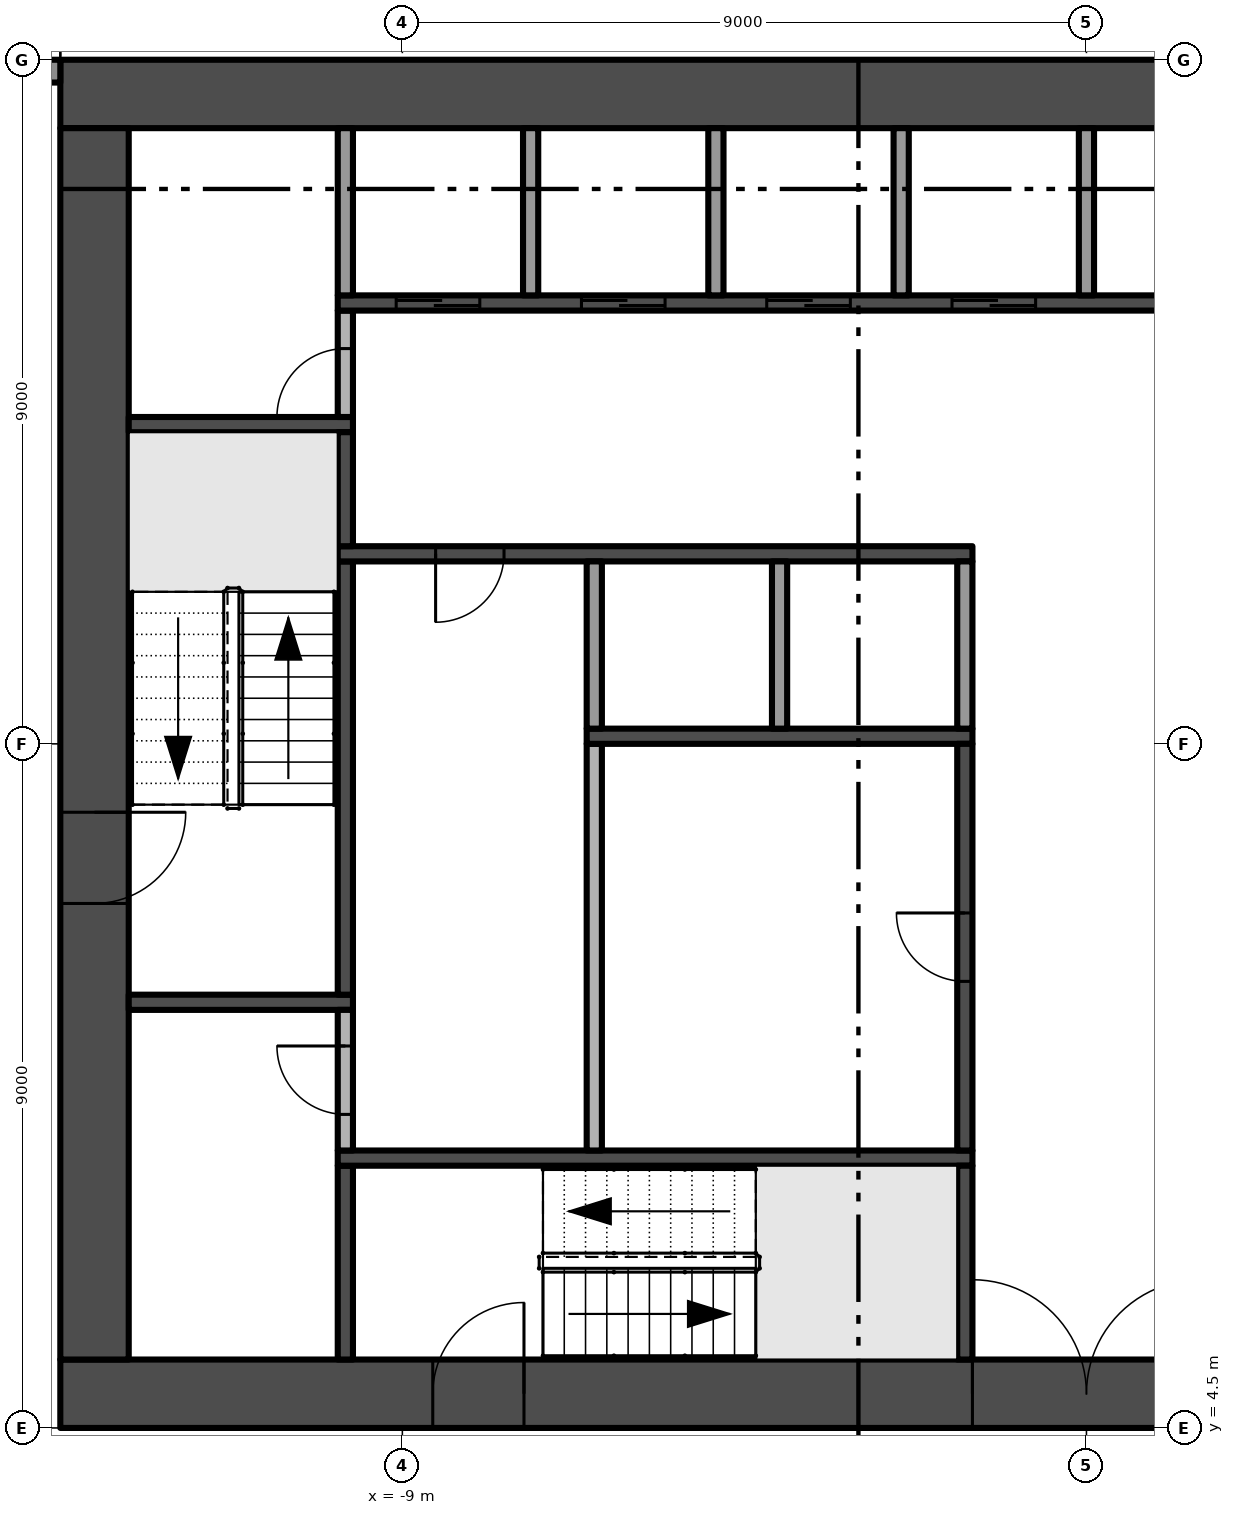
"""IFC4 building model, lengths in metres.
Left out: names, types, materials, properties, quantities, classifications, styles, units other than length and angle.
Written with IfcOpenShell. Run it as: python <this file> out.ifc"""

import sys

from ifc_helpers import new_model, si_unit, direction, frame, frame_2d, origin, place, context, subcontext, project, spatial, rectangle, extrude, element, fill, save


model = new_model("IFC4")
c1 = context("Model", 3, precision=1e-05, world=origin(), true_north=direction((0.0, 1.0)))
c2 = subcontext(c1, "Body", "Model", "MODEL_VIEW")
j1 = project(units=[si_unit("LENGTHUNIT", "METRE"), si_unit("PLANEANGLEUNIT", "RADIAN")], contexts=[c1])
p1 = place(None, origin())
s1 = spatial("IfcSite", under=j1, at=p1, CompositionType="ELEMENT")
p2 = place(p1, origin())
s2 = spatial("IfcBuilding", under=s1, at=p2, CompositionType="ELEMENT")
p3 = place(p2, frame((0.0, 0.0, 99.8)))
s3 = spatial("IfcBuildingStorey", under=s2, at=p3, CompositionType="ELEMENT", Elevation=99.8)
p4 = place(p3, frame((-13.5, 4.95, -0.3), z_axis=(0.0, 0.0, 1.0), x_axis=(1.0, 0.0, 0.0)))
e1 = element("IfcWall", 1, at=p4, inside=s3, PredefinedType="SHEAR", context=c2, shape_type="SweptSolid", body=[
    extrude(rectangle(XDim=27.0, YDim=0.9, at=frame_2d((13.5, 0.0))), origin(), (0.0, 0.0, 1.0), 3.8),
])
p5 = place(p4, frame((12.0, 0.0, 0.3)))
e2 = element("IfcOpeningElement", 2, at=p5, cuts=e1, PredefinedType="OPENING", context=c2, shape_type="SweptSolid", body=[
    extrude(rectangle(XDim=3.0, YDim=2.4, at=frame_2d((1.5, 1.2))), frame((0.0, 0.46, 0.0), z_axis=(0.0, -1.0, 0.0), x_axis=(1.0, 0.0, 0.0)), (0.0, 0.0, 1.0), 0.92),
])
p6 = place(p4, frame((4.9, 0.0, 0.3)))
e3 = element("IfcOpeningElement", 3, at=p6, cuts=e1, PredefinedType="OPENING", context=c2, shape_type="SweptSolid", body=[
    extrude(rectangle(XDim=1.2, YDim=2.2, at=frame_2d((0.6, 1.1))), frame((0.0, 0.46, 0.0), z_axis=(0.0, -1.0, 0.0), x_axis=(1.0, 0.0, 0.0)), (0.0, 0.0, 1.0), 0.92),
])
p7 = place(p4, frame((20.75, 0.0, 0.3)))
e4 = element("IfcOpeningElement", 4, at=p7, cuts=e1, PredefinedType="OPENING", context=c2, shape_type="SweptSolid", body=[
    extrude(rectangle(XDim=1.5, YDim=2.2, at=frame_2d((0.75, 1.1))), frame((0.0, 0.46, 0.0), z_axis=(0.0, -1.0, 0.0), x_axis=(1.0, 0.0, 0.0)), (0.0, 0.0, 1.0), 0.92),
])
p8 = place(p4, frame((17.4, 0.0, 0.3)))
e5 = element("IfcOpeningElement", 5, at=p8, cuts=e1, PredefinedType="OPENING", context=c2, shape_type="SweptSolid", body=[
    extrude(rectangle(XDim=1.2, YDim=2.2, at=frame_2d((0.6, 1.1))), frame((0.0, 0.46, 0.0), z_axis=(0.0, -1.0, 0.0), x_axis=(1.0, 0.0, 0.0)), (0.0, 0.0, 1.0), 0.92),
])
p9 = place(p3, frame((13.5, 22.05, -0.3), z_axis=(0.0, 0.0, 1.0), x_axis=(-1.0, 0.0, 0.0)))
e6 = element("IfcWall", 6, at=p9, inside=s3, PredefinedType="SHEAR", context=c2, shape_type="SweptSolid", body=[
    extrude(rectangle(XDim=27.0, YDim=0.9, at=frame_2d((13.5, 0.0))), origin(), (0.0, 0.0, 1.0), 3.8),
])
p10 = place(p3, frame((-13.05, 21.6, -0.3), z_axis=(0.0, 0.0, 1.0), x_axis=(0.0, -1.0, 0.0)))
e7 = element("IfcWall", 7, at=p10, inside=s3, PredefinedType="SHEAR", context=c2, shape_type="SweptSolid", body=[
    extrude(rectangle(XDim=16.2, YDim=0.9, at=frame_2d((8.1, 0.0))), origin(), (0.0, 0.0, 1.0), 3.8),
])
p11 = place(p10, frame((9.0, 0.0, 0.3)))
e8 = element("IfcOpeningElement", 8, at=p11, cuts=e7, PredefinedType="OPENING", context=c2, shape_type="SweptSolid", body=[
    extrude(rectangle(XDim=1.2, YDim=2.2, at=frame_2d((0.6, 1.1))), frame((0.0, 0.46, 0.0), z_axis=(0.0, -1.0, 0.0), x_axis=(1.0, 0.0, 0.0)), (0.0, 0.0, 1.0), 0.92),
])
p12 = place(p3, frame((-17.375, 22.35, 0.0), z_axis=(0.0, 0.0, 1.0), x_axis=(1.0, 0.0, 0.0)))
e9 = element("IfcWall", 9, at=p12, inside=s3, PredefinedType="SOLIDWALL", context=c2, shape_type="SweptSolid", body=[
    extrude(rectangle(XDim=3.875, YDim=0.3, at=frame_2d((1.938, 0.0))), origin(), (0.0, 0.0, 1.0), 3.5),
])
p13 = place(p12, frame((0.325, 0.0, 0.45)))
e10 = element("IfcOpeningElement", 10, at=p13, cuts=e9, PredefinedType="OPENING", context=c2, shape_type="SweptSolid", body=[
    extrude(rectangle(XDim=2.775, YDim=2.65, at=frame_2d((1.387, 1.325))), frame((0.0, 0.16, 0.0), z_axis=(0.0, -1.0, 0.0), x_axis=(1.0, 0.0, 0.0)), (0.0, 0.0, 1.0), 0.32),
])
for number, where, z_axis, x_axis in (
    (11, (-12.6, 10.1, 0.0), (0.0, 0.0, 1.0), (1.0, 0.0, 0.0)),
    (12, (-12.6, 17.7, 0.0), (0.0, 0.0, 1.0), (1.0, 0.0, 0.0)),
):
    element("IfcWall", number, at=place(p3, frame(where, z_axis=z_axis, x_axis=x_axis)), inside=s3, PredefinedType="SHEAR", context=c2, shape_type="SweptSolid", body=[
        extrude(rectangle(XDim=2.95, YDim=0.2, at=frame_2d((1.475, 0.0))), origin(), (0.0, 0.0, 1.0), 3.5),
    ])
p14 = place(p3, frame((-9.75, 5.4, 0.0), z_axis=(0.0, 0.0, 1.0), x_axis=(0.0, 1.0, 0.0)))
e13 = element("IfcWall", 13, at=p14, inside=s3, PredefinedType="SHEAR", context=c2, shape_type="SweptSolid", body=[
    extrude(rectangle(XDim=2.55, YDim=0.2, at=frame_2d((1.275, 0.0))), origin(), (0.0, 0.0, 1.0), 3.5),
])
p15 = place(p3, frame((-9.85, 8.05, 0.0), z_axis=(0.0, 0.0, 1.0), x_axis=(1.0, 0.0, 0.0)))
e14 = element("IfcWall", 14, at=p15, inside=s3, PredefinedType="SHEAR", context=c2, shape_type="SweptSolid", body=[
    extrude(rectangle(XDim=8.35, YDim=0.2, at=frame_2d((4.175, 0.0))), origin(), (0.0, 0.0, 1.0), 3.5),
])
p16 = place(p3, frame((-9.75, 8.15, 0.0), z_axis=(0.0, 0.0, 1.0), x_axis=(0.0, 1.0, 0.0)))
e15 = element("IfcWall", 15, at=p16, inside=s3, PredefinedType="PARTITIONING", context=c2, shape_type="SweptSolid", body=[
    extrude(rectangle(XDim=1.85, YDim=0.2, at=frame_2d((0.925, 0.0))), origin(), (0.0, 0.0, 1.0), 3.5),
])
p17 = place(p16, frame((0.475, 0.0, 0.0)))
e16 = element("IfcOpeningElement", 16, at=p17, cuts=e15, PredefinedType="OPENING", context=c2, shape_type="SweptSolid", body=[
    extrude(rectangle(XDim=0.9, YDim=2.1, at=frame_2d((0.45, 1.05))), frame((0.0, 0.11, 0.0), z_axis=(0.0, -1.0, 0.0), x_axis=(1.0, 0.0, 0.0)), (0.0, 0.0, 1.0), 0.22),
])
p18 = place(p3, frame((-9.75, 10.2, 0.0), z_axis=(0.0, 0.0, 1.0), x_axis=(0.0, 1.0, 0.0)))
e17 = element("IfcWall", 17, at=p18, inside=s3, PredefinedType="SHEAR", context=c2, shape_type="SweptSolid", body=[
    extrude(rectangle(XDim=5.7, YDim=0.2, at=frame_2d((2.85, 0.0))), origin(), (0.0, 0.0, 1.0), 3.5),
])
p19 = place(p3, frame((-1.5, 16.0, 0.0), z_axis=(0.0, 0.0, 1.0), x_axis=(-1.0, 0.0, 0.0)))
e18 = element("IfcWall", 18, at=p19, inside=s3, PredefinedType="SHEAR", context=c2, shape_type="SweptSolid", body=[
    extrude(rectangle(XDim=8.35, YDim=0.2, at=frame_2d((4.175, 0.0))), origin(), (0.0, 0.0, 1.0), 3.5),
])
p20 = place(p19, frame((6.162, 0.0, 0.0)))
e19 = element("IfcOpeningElement", 19, at=p20, cuts=e18, PredefinedType="OPENING", context=c2, shape_type="SweptSolid", body=[
    extrude(rectangle(XDim=0.9, YDim=2.1, at=frame_2d((0.45, 1.05))), frame((0.0, 0.11, 0.0), z_axis=(0.0, -1.0, 0.0), x_axis=(1.0, 0.0, 0.0)), (0.0, 0.0, 1.0), 0.22),
])
p21 = place(p3, frame((-9.75, 16.1, 0.0), z_axis=(0.0, 0.0, 1.0), x_axis=(0.0, 1.0, 0.0)))
e20 = element("IfcWall", 20, at=p21, inside=s3, PredefinedType="SHEAR", context=c2, shape_type="SweptSolid", body=[
    extrude(rectangle(XDim=1.5, YDim=0.2, at=frame_2d((0.75, 0.0))), origin(), (0.0, 0.0, 1.0), 3.5),
])
p22 = place(p3, frame((-9.75, 17.8, 0.0), z_axis=(0.0, 0.0, 1.0), x_axis=(0.0, 1.0, 0.0)))
e21 = element("IfcWall", 21, at=p22, inside=s3, PredefinedType="PARTITIONING", context=c2, shape_type="SweptSolid", body=[
    extrude(rectangle(XDim=1.4, YDim=0.2, at=frame_2d((0.7, 0.0))), origin(), (0.0, 0.0, 1.0), 3.5),
])
p23 = place(p22, origin())
e22 = element("IfcOpeningElement", 22, at=p23, cuts=e21, PredefinedType="OPENING", context=c2, shape_type="SweptSolid", body=[
    extrude(rectangle(XDim=0.9, YDim=2.1, at=frame_2d((0.45, 1.05))), frame((0.0, 0.11, 0.0), z_axis=(0.0, -1.0, 0.0), x_axis=(1.0, 0.0, 0.0)), (0.0, 0.0, 1.0), 0.22),
])
p24 = place(p3, frame((-9.85, 19.3, 0.0), z_axis=(0.0, 0.0, 1.0), x_axis=(1.0, 0.0, 0.0)))
e23 = element("IfcWall", 23, at=p24, inside=s3, PredefinedType="SHEAR", context=c2, shape_type="SweptSolid", body=[
    extrude(rectangle(XDim=19.7, YDim=0.2, at=frame_2d((9.85, 0.0))), origin(), (0.0, 0.0, 1.0), 3.5),
])
p25 = place(p24, frame((0.769, 0.0, 0.0)))
e24 = element("IfcOpeningElement", 24, at=p25, cuts=e23, PredefinedType="OPENING", context=c2, shape_type="SweptSolid", body=[
    extrude(rectangle(XDim=1.1, YDim=2.1, at=frame_2d((0.55, 1.05))), frame((0.0, 0.11, 0.0), z_axis=(0.0, -1.0, 0.0), x_axis=(1.0, 0.0, 0.0)), (0.0, 0.0, 1.0), 0.22),
])
p26 = place(p24, frame((3.206, 0.0, 0.0)))
e25 = element("IfcOpeningElement", 25, at=p26, cuts=e23, PredefinedType="OPENING", context=c2, shape_type="SweptSolid", body=[
    extrude(rectangle(XDim=1.1, YDim=2.1, at=frame_2d((0.55, 1.05))), frame((0.0, 0.11, 0.0), z_axis=(0.0, -1.0, 0.0), x_axis=(1.0, 0.0, 0.0)), (0.0, 0.0, 1.0), 0.22),
])
p27 = place(p24, frame((5.644, 0.0, 0.0)))
e26 = element("IfcOpeningElement", 26, at=p27, cuts=e23, PredefinedType="OPENING", context=c2, shape_type="SweptSolid", body=[
    extrude(rectangle(XDim=1.1, YDim=2.1, at=frame_2d((0.55, 1.05))), frame((0.0, 0.11, 0.0), z_axis=(0.0, -1.0, 0.0), x_axis=(1.0, 0.0, 0.0)), (0.0, 0.0, 1.0), 0.22),
])
p28 = place(p24, frame((8.081, 0.0, 0.0)))
e27 = element("IfcOpeningElement", 27, at=p28, cuts=e23, PredefinedType="OPENING", context=c2, shape_type="SweptSolid", body=[
    extrude(rectangle(XDim=1.1, YDim=2.1, at=frame_2d((0.55, 1.05))), frame((0.0, 0.11, 0.0), z_axis=(0.0, -1.0, 0.0), x_axis=(1.0, 0.0, 0.0)), (0.0, 0.0, 1.0), 0.22),
])
for number, where, z_axis, x_axis in (
    (28, (-9.75, 19.4, 0.0), (0.0, 0.0, 1.0), (0.0, 1.0, 0.0)),
    (29, (-7.312, 19.4, 0.0), (0.0, 0.0, 1.0), (0.0, 1.0, 0.0)),
):
    element("IfcWall", number, at=place(p3, frame(where, z_axis=z_axis, x_axis=x_axis)), inside=s3, PredefinedType="PARTITIONING", context=c2, shape_type="SweptSolid", body=[
        extrude(rectangle(XDim=2.2, YDim=0.2, at=frame_2d((1.1, 0.0))), origin(), (0.0, 0.0, 1.0), 3.5),
    ])
p29 = place(p3, frame((-6.475, 8.15, 0.0), z_axis=(0.0, 0.0, 1.0), x_axis=(0.0, 1.0, 0.0)))
e30 = element("IfcWall", 30, at=p29, inside=s3, PredefinedType="PARTITIONING", context=c2, shape_type="SweptSolid", body=[
    extrude(rectangle(XDim=5.35, YDim=0.2, at=frame_2d((2.675, 0.0))), origin(), (0.0, 0.0, 1.0), 3.5),
])
p30 = place(p3, frame((-6.575, 13.6, 0.0), z_axis=(0.0, 0.0, 1.0), x_axis=(1.0, 0.0, 0.0)))
e31 = element("IfcWall", 31, at=p30, inside=s3, PredefinedType="SHEAR", context=c2, shape_type="SweptSolid", body=[
    extrude(rectangle(XDim=5.075, YDim=0.2, at=frame_2d((2.538, 0.0))), origin(), (0.0, 0.0, 1.0), 3.5),
])
for number, where, z_axis, x_axis in (
    (32, (-6.475, 13.7, 0.0), (0.0, 0.0, 1.0), (0.0, 1.0, 0.0)),
    (33, (-4.875, 19.4, 0.0), (0.0, 0.0, 1.0), (0.0, 1.0, 0.0)),
    (34, (-4.037, 13.7, 0.0), (0.0, 0.0, 1.0), (0.0, 1.0, 0.0)),
    (35, (-2.438, 19.4, 0.0), (0.0, 0.0, 1.0), (0.0, 1.0, 0.0)),
):
    element("IfcWall", number, at=place(p3, frame(where, z_axis=z_axis, x_axis=x_axis)), inside=s3, PredefinedType="PARTITIONING", context=c2, shape_type="SweptSolid", body=[
        extrude(rectangle(XDim=2.2, YDim=0.2, at=frame_2d((1.1, 0.0))), origin(), (0.0, 0.0, 1.0), 3.5),
    ])
p31 = place(p3, frame((-1.6, 5.4, 0.0), z_axis=(0.0, 0.0, 1.0), x_axis=(0.0, 1.0, 0.0)))
e36 = element("IfcWall", 36, at=p31, inside=s3, PredefinedType="SHEAR", context=c2, shape_type="SweptSolid", body=[
    extrude(rectangle(XDim=2.55, YDim=0.2, at=frame_2d((1.275, 0.0))), origin(), (0.0, 0.0, 1.0), 3.5),
])
p32 = place(p3, frame((-1.6, 8.15, 0.0), z_axis=(0.0, 0.0, 1.0), x_axis=(0.0, 1.0, 0.0)))
e37 = element("IfcWall", 37, at=p32, inside=s3, PredefinedType="SHEAR", context=c2, shape_type="SweptSolid", body=[
    extrude(rectangle(XDim=5.35, YDim=0.2, at=frame_2d((2.675, 0.0))), origin(), (0.0, 0.0, 1.0), 3.5),
])
p33 = place(p32, frame((2.225, 0.0, 0.0)))
e38 = element("IfcOpeningElement", 38, at=p33, cuts=e37, PredefinedType="OPENING", context=c2, shape_type="SweptSolid", body=[
    extrude(rectangle(XDim=0.9, YDim=2.1, at=frame_2d((0.45, 1.05))), frame((0.0, 0.11, 0.0), z_axis=(0.0, -1.0, 0.0), x_axis=(1.0, 0.0, 0.0)), (0.0, 0.0, 1.0), 0.22),
])
for number, where, z_axis, x_axis in (
    (39, (-1.6, 13.7, 0.0), (0.0, 0.0, 1.0), (0.0, 1.0, 0.0)),
    (40, (0.0, 19.4, 0.0), (0.0, 0.0, 1.0), (0.0, 1.0, 0.0)),
):
    element("IfcWall", number, at=place(p3, frame(where, z_axis=z_axis, x_axis=x_axis)), inside=s3, PredefinedType="PARTITIONING", context=c2, shape_type="SweptSolid", body=[
        extrude(rectangle(XDim=2.2, YDim=0.2, at=frame_2d((1.1, 0.0))), origin(), (0.0, 0.0, 1.0), 3.5),
    ])
p34 = place(p5, frame((3.0, 0.0, 0.0), z_axis=(0.0, 0.0, 1.0), x_axis=(-1.0, 0.0, 0.0)))
e41 = element("IfcDoor", 41, at=p34, inside=s3, OperationType="DOUBLE_DOOR_SINGLE_SWING", PredefinedType="DOOR", context=c2, shape_type="SweptSolid", body=[
    extrude(rectangle(XDim=3.0, YDim=2.4, at=frame_2d((1.5, 1.2))), frame((0.0, 0.025, 0.0), z_axis=(0.0, -1.0, 0.0), x_axis=(1.0, 0.0, 0.0)), (0.0, 0.0, 1.0), 0.05),
])
fill(e2, e41)
p35 = place(p11, frame((1.2, 0.0, 0.0), z_axis=(0.0, 0.0, 1.0), x_axis=(-1.0, 0.0, 0.0)))
e42 = element("IfcDoor", 42, at=p35, inside=s3, OperationType="SINGLE_SWING_RIGHT", PredefinedType="DOOR", context=c2, shape_type="SweptSolid", body=[
    extrude(rectangle(XDim=1.2, YDim=2.2, at=frame_2d((0.6, 1.1))), frame((0.0, 0.025, 0.0), z_axis=(0.0, -1.0, 0.0), x_axis=(1.0, 0.0, 0.0)), (0.0, 0.0, 1.0), 0.05),
])
fill(e8, e42)
p36 = place(p6, frame((1.2, 0.0, 0.0), z_axis=(0.0, 0.0, 1.0), x_axis=(-1.0, 0.0, 0.0)))
e43 = element("IfcDoor", 43, at=p36, inside=s3, OperationType="SINGLE_SWING_LEFT", PredefinedType="DOOR", context=c2, shape_type="SweptSolid", body=[
    extrude(rectangle(XDim=1.2, YDim=2.2, at=frame_2d((0.6, 1.1))), frame((0.0, 0.025, 0.0), z_axis=(0.0, -1.0, 0.0), x_axis=(1.0, 0.0, 0.0)), (0.0, 0.0, 1.0), 0.05),
])
fill(e3, e43)
p37 = place(p25, origin())
e44 = element("IfcDoor", 44, at=p37, inside=s3, OperationType="SLIDING_TO_LEFT", PredefinedType="DOOR", context=c2, shape_type="SweptSolid", body=[
    extrude(rectangle(XDim=1.1, YDim=2.1, at=frame_2d((0.55, 1.05))), frame((0.0, 0.025, 0.0), z_axis=(0.0, -1.0, 0.0), x_axis=(1.0, 0.0, 0.0)), (0.0, 0.0, 1.0), 0.05),
])
fill(e24, e44)
p38 = place(p26, origin())
e45 = element("IfcDoor", 45, at=p38, inside=s3, OperationType="SLIDING_TO_LEFT", PredefinedType="DOOR", context=c2, shape_type="SweptSolid", body=[
    extrude(rectangle(XDim=1.1, YDim=2.1, at=frame_2d((0.55, 1.05))), frame((0.0, 0.025, 0.0), z_axis=(0.0, -1.0, 0.0), x_axis=(1.0, 0.0, 0.0)), (0.0, 0.0, 1.0), 0.05),
])
fill(e25, e45)
p39 = place(p27, origin())
e46 = element("IfcDoor", 46, at=p39, inside=s3, OperationType="SLIDING_TO_LEFT", PredefinedType="DOOR", context=c2, shape_type="SweptSolid", body=[
    extrude(rectangle(XDim=1.1, YDim=2.1, at=frame_2d((0.55, 1.05))), frame((0.0, 0.025, 0.0), z_axis=(0.0, -1.0, 0.0), x_axis=(1.0, 0.0, 0.0)), (0.0, 0.0, 1.0), 0.05),
])
fill(e26, e46)
p40 = place(p28, origin())
e47 = element("IfcDoor", 47, at=p40, inside=s3, OperationType="SLIDING_TO_LEFT", PredefinedType="DOOR", context=c2, shape_type="SweptSolid", body=[
    extrude(rectangle(XDim=1.1, YDim=2.1, at=frame_2d((0.55, 1.05))), frame((0.0, 0.025, 0.0), z_axis=(0.0, -1.0, 0.0), x_axis=(1.0, 0.0, 0.0)), (0.0, 0.0, 1.0), 0.05),
])
fill(e27, e47)
p41 = place(p20, origin())
e48 = element("IfcDoor", 48, at=p41, inside=s3, OperationType="SINGLE_SWING_RIGHT", PredefinedType="DOOR", context=c2, shape_type="SweptSolid", body=[
    extrude(rectangle(XDim=0.9, YDim=2.1, at=frame_2d((0.45, 1.05))), frame((0.0, 0.025, 0.0), z_axis=(0.0, -1.0, 0.0), x_axis=(1.0, 0.0, 0.0)), (0.0, 0.0, 1.0), 0.05),
])
fill(e19, e48)
p42 = place(p33, origin())
e49 = element("IfcDoor", 49, at=p42, inside=s3, OperationType="SINGLE_SWING_RIGHT", PredefinedType="DOOR", context=c2, shape_type="SweptSolid", body=[
    extrude(rectangle(XDim=0.9, YDim=2.1, at=frame_2d((0.45, 1.05))), frame((0.0, 0.025, 0.0), z_axis=(0.0, -1.0, 0.0), x_axis=(1.0, 0.0, 0.0)), (0.0, 0.0, 1.0), 0.05),
])
fill(e38, e49)
p43 = place(p23, origin())
e50 = element("IfcDoor", 50, at=p43, inside=s3, OperationType="SINGLE_SWING_LEFT", PredefinedType="DOOR", context=c2, shape_type="SweptSolid", body=[
    extrude(rectangle(XDim=0.9, YDim=2.1, at=frame_2d((0.45, 1.05))), frame((0.0, 0.025, 0.0), z_axis=(0.0, -1.0, 0.0), x_axis=(1.0, 0.0, 0.0)), (0.0, 0.0, 1.0), 0.05),
])
fill(e22, e50)
p44 = place(p17, origin())
e51 = element("IfcDoor", 51, at=p44, inside=s3, OperationType="SINGLE_SWING_RIGHT", PredefinedType="DOOR", context=c2, shape_type="SweptSolid", body=[
    extrude(rectangle(XDim=0.9, YDim=2.1, at=frame_2d((0.45, 1.05))), frame((0.0, 0.025, 0.0), z_axis=(0.0, -1.0, 0.0), x_axis=(1.0, 0.0, 0.0)), (0.0, 0.0, 1.0), 0.05),
])
fill(e16, e51)
save(model, sys.argv[1])
